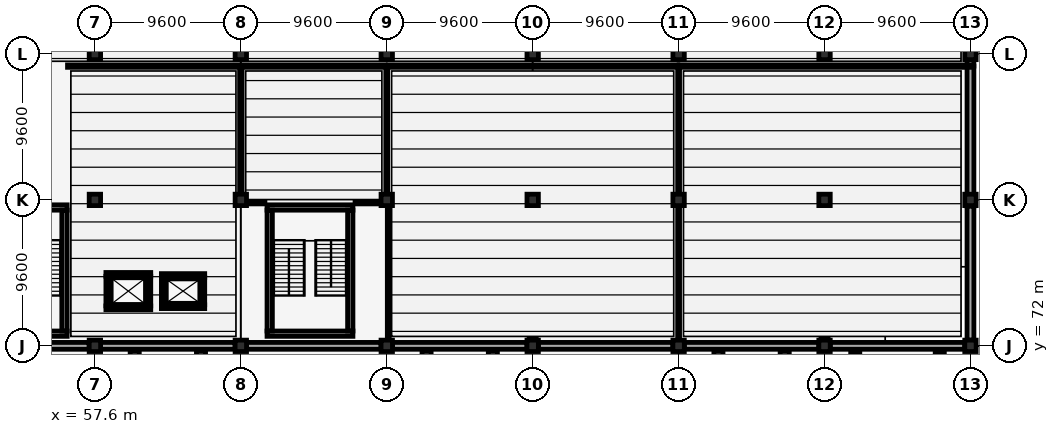
"""IFC4 building model, lengths in metres.
Left out: names, types, materials, properties, quantities, classifications, styles, units other than length and angle.
Written with IfcOpenShell. Run it as: python <this file> out.ifc"""

import sys

from ifc_helpers import new_model, si_unit, direction, frame, frame_2d, origin, origin_2d, place, context, subcontext, project, spatial, rectangle, extrude, element, fill, save


model = new_model("IFC4")
c1 = context("Model", 3, precision=1e-05, world=origin(), true_north=direction((0.0, 1.0)))
c2 = subcontext(c1, "Body", "Model", "MODEL_VIEW")
j1 = project(units=[si_unit("LENGTHUNIT", "METRE"), si_unit("PLANEANGLEUNIT", "RADIAN")], contexts=[c1])
p1 = place(None, origin())
s1 = spatial("IfcSite", under=j1, at=p1, CompositionType="ELEMENT")
p2 = place(p1, origin())
s2 = spatial("IfcBuilding", under=s1, at=p2, CompositionType="ELEMENT")
p3 = place(p2, frame((0.0, 0.0, -4.2)))
s3 = spatial("IfcBuildingStorey", under=s2, at=p3, CompositionType="ELEMENT", Elevation=-4.2)
for number, where, z_axis, x_axis in (
    (1, (57.6, 72.0, 0.0), (0.0, 0.0, 1.0), (1.0, 0.0, 0.0)),
    (2, (57.6, 81.6, 0.0), (0.0, 0.0, 1.0), (1.0, 0.0, 0.0)),
    (3, (57.6, 91.2, 0.0), (0.0, 0.0, 1.0), (1.0, 0.0, 0.0)),
    (4, (67.2, 72.0, 0.0), (0.0, 0.0, 1.0), (1.0, 0.0, 0.0)),
    (5, (67.2, 81.6, 0.0), (0.0, 0.0, 1.0), (1.0, 0.0, 0.0)),
    (6, (67.2, 91.2, 0.0), (0.0, 0.0, 1.0), (1.0, 0.0, 0.0)),
    (7, (76.8, 72.0, 0.0), (0.0, 0.0, 1.0), (1.0, 0.0, 0.0)),
    (8, (76.8, 81.6, 0.0), (0.0, 0.0, 1.0), (1.0, 0.0, 0.0)),
    (9, (76.8, 91.2, 0.0), (0.0, 0.0, 1.0), (1.0, 0.0, 0.0)),
    (10, (86.4, 72.0, 0.0), (0.0, 0.0, 1.0), (1.0, 0.0, 0.0)),
    (11, (86.4, 81.6, 0.0), (0.0, 0.0, 1.0), (1.0, 0.0, 0.0)),
    (12, (86.4, 91.2, 0.0), (0.0, 0.0, 1.0), (1.0, 0.0, 0.0)),
    (13, (96.0, 72.0, 0.0), (0.0, 0.0, 1.0), (1.0, 0.0, 0.0)),
    (14, (96.0, 81.6, 0.0), (0.0, 0.0, 1.0), (1.0, 0.0, 0.0)),
    (15, (96.0, 91.2, 0.0), (0.0, 0.0, 1.0), (1.0, 0.0, 0.0)),
    (16, (105.6, 72.0, 0.0), (0.0, 0.0, 1.0), (1.0, 0.0, 0.0)),
    (17, (105.6, 81.6, 0.0), (0.0, 0.0, 1.0), (1.0, 0.0, 0.0)),
    (18, (105.6, 91.2, 0.0), (0.0, 0.0, 1.0), (1.0, 0.0, 0.0)),
    (19, (115.2, 72.0, 0.0), (0.0, 0.0, 1.0), (1.0, 0.0, 0.0)),
    (20, (115.2, 81.6, 0.0), (0.0, 0.0, 1.0), (1.0, 0.0, 0.0)),
    (21, (115.2, 91.2, 0.0), (0.0, 0.0, 1.0), (1.0, 0.0, 0.0)),
):
    element("IfcColumn", number, at=place(p3, frame(where, z_axis=z_axis, x_axis=x_axis)), inside=s3, PredefinedType="COLUMN", context=c2, shape_type="SweptSolid", body=[
        extrude(rectangle(XDim=0.75, YDim=0.75, at=origin_2d()), origin(), (0.0, 0.0, 1.0), 4.2),
    ])
p4 = place(p3, frame((48.375, 72.0, 0.0), z_axis=(0.0, 0.0, 1.0), x_axis=(1.0, 0.0, 0.0)))
e22 = element("IfcWall", 22, at=p4, inside=s3, PredefinedType="SOLIDWALL", context=c2, shape_type="SweptSolid", body=[
    extrude(rectangle(XDim=8.85, YDim=0.45, at=frame_2d((4.425, 0.0))), origin(), (0.0, 0.0, 1.0), 3.84),
])
p5 = place(p3, frame((57.975, 72.0, 0.0), z_axis=(0.0, 0.0, 1.0), x_axis=(1.0, 0.0, 0.0)))
e23 = element("IfcWall", 23, at=p5, inside=s3, PredefinedType="SOLIDWALL", context=c2, shape_type="SweptSolid", body=[
    extrude(rectangle(XDim=8.85, YDim=0.45, at=frame_2d((4.425, 0.0))), origin(), (0.0, 0.0, 1.0), 3.84),
])
p6 = place(p3, frame((67.575, 72.0, 0.0), z_axis=(0.0, 0.0, 1.0), x_axis=(1.0, 0.0, 0.0)))
e24 = element("IfcWall", 24, at=p6, inside=s3, PredefinedType="SOLIDWALL", context=c2, shape_type="SweptSolid", body=[
    extrude(rectangle(XDim=8.85, YDim=0.45, at=frame_2d((4.425, 0.0))), origin(), (0.0, 0.0, 1.0), 3.84),
])
p7 = place(p3, frame((77.175, 72.0, 0.0), z_axis=(0.0, 0.0, 1.0), x_axis=(1.0, 0.0, 0.0)))
e25 = element("IfcWall", 25, at=p7, inside=s3, PredefinedType="SOLIDWALL", context=c2, shape_type="SweptSolid", body=[
    extrude(rectangle(XDim=8.85, YDim=0.45, at=frame_2d((4.425, 0.0))), origin(), (0.0, 0.0, 1.0), 3.84),
])
for number, where, z_axis, x_axis in (
    (26, (86.775, 72.0, 0.0), (0.0, 0.0, 1.0), (1.0, 0.0, 0.0)),
    (27, (96.375, 72.0, 0.0), (0.0, 0.0, 1.0), (1.0, 0.0, 0.0)),
):
    element("IfcWall", number, at=place(p3, frame(where, z_axis=z_axis, x_axis=x_axis)), inside=s3, PredefinedType="SOLIDWALL", context=c2, shape_type="SweptSolid", body=[
        extrude(rectangle(XDim=8.85, YDim=0.45, at=frame_2d((4.425, 0.0))), origin(), (0.0, 0.0, 1.0), 3.84),
    ])
p8 = place(p3, frame((105.975, 72.0, 0.0), z_axis=(0.0, 0.0, 1.0), x_axis=(1.0, 0.0, 0.0)))
e28 = element("IfcWall", 28, at=p8, inside=s3, PredefinedType="SOLIDWALL", context=c2, shape_type="SweptSolid", body=[
    extrude(rectangle(XDim=8.85, YDim=0.45, at=frame_2d((4.425, 0.0))), origin(), (0.0, 0.0, 1.0), 3.84),
])
p9 = place(p3, frame((115.2, 72.375, 0.0), z_axis=(0.0, 0.0, 1.0), x_axis=(0.0, 1.0, 0.0)))
e29 = element("IfcWall", 29, at=p9, inside=s3, PredefinedType="SOLIDWALL", context=c2, shape_type="SweptSolid", body=[
    extrude(rectangle(XDim=8.825, YDim=0.45, at=frame_2d((4.413, 0.0))), origin(), (0.0, 0.0, 1.0), 3.84),
])
p10 = place(p3, frame((115.2, 81.2, 0.0), z_axis=(0.0, 0.0, 1.0), x_axis=(0.0, 1.0, 0.0)))
e30 = element("IfcWall", 30, at=p10, inside=s3, PredefinedType="SOLIDWALL", context=c2, shape_type="SweptSolid", body=[
    extrude(rectangle(XDim=9.2, YDim=0.45, at=frame_2d((4.6, 0.0))), origin(), (0.0, 0.0, 1.0), 3.84),
])
p11 = place(p3, frame((115.2, 90.4, 0.0), z_axis=(0.0, 0.0, 1.0), x_axis=(0.0, 1.0, 0.0)))
e31 = element("IfcWall", 31, at=p11, inside=s3, PredefinedType="SOLIDWALL", context=c2, shape_type="SweptSolid", body=[
    extrude(rectangle(XDim=9.2, YDim=0.45, at=frame_2d((4.6, 0.0))), origin(), (0.0, 0.0, 1.0), 3.84),
])
for number, where, z_axis, x_axis in (
    (32, (64.58, 71.38, 0.0), (0.0, 0.0, 1.0), (1.0, 0.0, 0.0)),
    (33, (60.22, 71.38, 0.0), (0.0, 0.0, 1.0), (1.0, 0.0, 0.0)),
    (34, (83.78, 71.38, 0.0), (0.0, 0.0, 1.0), (1.0, 0.0, 0.0)),
    (35, (79.42, 71.38, 0.0), (0.0, 0.0, 1.0), (1.0, 0.0, 0.0)),
    (36, (102.98, 71.38, 0.0), (0.0, 0.0, 1.0), (1.0, 0.0, 0.0)),
    (37, (98.62, 71.38, 0.0), (0.0, 0.0, 1.0), (1.0, 0.0, 0.0)),
    (38, (113.18, 71.28, 0.0), (0.0, 0.0, 1.0), (1.0, 0.0, 0.0)),
    (39, (107.62, 71.28, 0.0), (0.0, 0.0, 1.0), (1.0, 0.0, 0.0)),
):
    element("IfcColumn", number, at=place(p3, frame(where, z_axis=z_axis, x_axis=x_axis)), inside=s3, PredefinedType="COLUMN", context=c2, shape_type="SweptSolid", body=[
        extrude(rectangle(XDim=0.6, YDim=0.6, at=origin_2d()), origin(), (0.0, 0.0, 1.0), 4.2),
    ])
for number, where, z_axis, x_axis in (
    (40, (55.775, 72.8, 0.0), (0.0, 0.0, 1.0), (-1.0, 0.0, 0.0)),
    (41, (50.125, 81.1, 0.0), (0.0, 0.0, 1.0), (1.0, 0.0, 0.0)),
):
    element("IfcWall", number, at=place(p3, frame(where, z_axis=z_axis, x_axis=x_axis)), inside=s3, PredefinedType="SHEAR", context=c2, shape_type="SweptSolid", body=[
        extrude(rectangle(XDim=5.65, YDim=0.35, at=frame_2d((2.825, 0.0))), origin(), (0.0, 0.0, 1.0), 3.95),
    ])
p12 = place(p3, frame((55.6, 80.925, 0.0), z_axis=(0.0, 0.0, 1.0), x_axis=(0.0, -1.0, 0.0)))
e42 = element("IfcWall", 42, at=p12, inside=s3, PredefinedType="SHEAR", context=c2, shape_type="SweptSolid", body=[
    extrude(rectangle(XDim=7.95, YDim=0.35, at=frame_2d((3.975, 0.0))), origin(), (0.0, 0.0, 1.0), 3.95),
])
p13 = place(p12, frame((5.68, 0.0, 0.0)))
e43 = element("IfcOpeningElement", 43, at=p13, cuts=e42, PredefinedType="OPENING", context=c2, shape_type="SweptSolid", body=[
    extrude(rectangle(XDim=2.05, YDim=2.15, at=frame_2d((1.025, 1.075))), frame((0.0, 0.185, 0.0), z_axis=(0.0, -1.0, 0.0), x_axis=(1.0, 0.0, 0.0)), (0.0, 0.0, 1.0), 0.37),
])
for number, where, z_axis, x_axis in (
    (44, (74.575, 72.8, 0.0), (0.0, 0.0, 1.0), (-1.0, 0.0, 0.0)),
    (45, (68.925, 81.1, 0.0), (0.0, 0.0, 1.0), (1.0, 0.0, 0.0)),
):
    element("IfcWall", number, at=place(p3, frame(where, z_axis=z_axis, x_axis=x_axis)), inside=s3, PredefinedType="SHEAR", context=c2, shape_type="SweptSolid", body=[
        extrude(rectangle(XDim=5.65, YDim=0.35, at=frame_2d((2.825, 0.0))), origin(), (0.0, 0.0, 1.0), 3.95),
    ])
p14 = place(p3, frame((69.1, 72.975, 0.0), z_axis=(0.0, 0.0, 1.0), x_axis=(0.0, 1.0, 0.0)))
e46 = element("IfcWall", 46, at=p14, inside=s3, PredefinedType="SHEAR", context=c2, shape_type="SweptSolid", body=[
    extrude(rectangle(XDim=7.95, YDim=0.35, at=frame_2d((3.975, 0.0))), origin(), (0.0, 0.0, 1.0), 3.95),
])
p15 = place(p3, frame((74.4, 80.925, 0.0), z_axis=(0.0, 0.0, 1.0), x_axis=(0.0, -1.0, 0.0)))
e47 = element("IfcWall", 47, at=p15, inside=s3, PredefinedType="SHEAR", context=c2, shape_type="SweptSolid", body=[
    extrude(rectangle(XDim=7.95, YDim=0.35, at=frame_2d((3.975, 0.0))), origin(), (0.0, 0.0, 1.0), 3.95),
])
p16 = place(p15, frame((5.68, 0.0, 0.0)))
e48 = element("IfcOpeningElement", 48, at=p16, cuts=e47, PredefinedType="OPENING", context=c2, shape_type="SweptSolid", body=[
    extrude(rectangle(XDim=2.05, YDim=2.15, at=frame_2d((1.025, 1.075))), frame((0.0, 0.185, 0.0), z_axis=(0.0, -1.0, 0.0), x_axis=(1.0, 0.0, 0.0)), (0.0, 0.0, 1.0), 0.37),
])
p17 = place(p3, frame((61.275, 74.5, -1.5), z_axis=(0.0, 0.0, 1.0), x_axis=(-1.0, 0.0, 0.0)))
e49 = element("IfcWall", 49, at=p17, inside=s3, PredefinedType="SOLIDWALL", context=c2, shape_type="SweptSolid", body=[
    extrude(rectangle(XDim=2.95, YDim=0.25, at=frame_2d((1.475, 0.0))), origin(), (0.0, 0.0, 1.0), 5.45),
])
p18 = place(p3, frame((58.325, 76.7, -1.5), z_axis=(0.0, 0.0, 1.0), x_axis=(1.0, 0.0, 0.0)))
e50 = element("IfcWall", 50, at=p18, inside=s3, PredefinedType="SOLIDWALL", context=c2, shape_type="SweptSolid", body=[
    extrude(rectangle(XDim=2.95, YDim=0.25, at=frame_2d((1.475, 0.0))), origin(), (0.0, 0.0, 1.0), 5.45),
])
p19 = place(p18, frame((0.925, 0.0, 1.5)))
e51 = element("IfcOpeningElement", 51, at=p19, cuts=e50, PredefinedType="OPENING", context=c2, shape_type="SweptSolid", body=[
    extrude(rectangle(XDim=1.1, YDim=2.15, at=frame_2d((0.55, 1.075))), frame((0.0, 0.135, 0.0), z_axis=(0.0, -1.0, 0.0), x_axis=(1.0, 0.0, 0.0)), (0.0, 0.0, 1.0), 0.27),
])
for number, where, z_axis, x_axis in (
    (52, (58.45, 74.625, -1.5), (0.0, 0.0, 1.0), (0.0, 1.0, 0.0)),
    (53, (61.15, 76.575, -1.5), (0.0, 0.0, 1.0), (0.0, -1.0, 0.0)),
):
    element("IfcWall", number, at=place(p3, frame(where, z_axis=z_axis, x_axis=x_axis)), inside=s3, PredefinedType="SOLIDWALL", context=c2, shape_type="SweptSolid", body=[
        extrude(rectangle(XDim=1.95, YDim=0.25, at=frame_2d((0.975, 0.0))), origin(), (0.0, 0.0, 1.0), 5.45),
    ])
p20 = place(p3, frame((64.825, 74.575, -1.5), z_axis=(0.0, 0.0, 1.0), x_axis=(-1.0, 0.0, 0.0)))
e54 = element("IfcWall", 54, at=p20, inside=s3, PredefinedType="SOLIDWALL", context=c2, shape_type="SweptSolid", body=[
    extrude(rectangle(XDim=2.85, YDim=0.25, at=frame_2d((1.425, 0.0))), origin(), (0.0, 0.0, 1.0), 5.45),
])
p21 = place(p3, frame((61.975, 76.625, -1.5), z_axis=(0.0, 0.0, 1.0), x_axis=(1.0, 0.0, 0.0)))
e55 = element("IfcWall", 55, at=p21, inside=s3, PredefinedType="SOLIDWALL", context=c2, shape_type="SweptSolid", body=[
    extrude(rectangle(XDim=2.85, YDim=0.25, at=frame_2d((1.425, 0.0))), origin(), (0.0, 0.0, 1.0), 5.45),
])
p22 = place(p21, frame((0.875, 0.0, 1.5)))
e56 = element("IfcOpeningElement", 56, at=p22, cuts=e55, PredefinedType="OPENING", context=c2, shape_type="SweptSolid", body=[
    extrude(rectangle(XDim=1.1, YDim=2.15, at=frame_2d((0.55, 1.075))), frame((0.0, 0.135, 0.0), z_axis=(0.0, -1.0, 0.0), x_axis=(1.0, 0.0, 0.0)), (0.0, 0.0, 1.0), 0.27),
])
for number, where, z_axis, x_axis in (
    (57, (62.1, 74.7, -1.5), (0.0, 0.0, 1.0), (0.0, 1.0, 0.0)),
    (58, (64.7, 76.5, -1.5), (0.0, 0.0, 1.0), (0.0, -1.0, 0.0)),
):
    element("IfcWall", number, at=place(p3, frame(where, z_axis=z_axis, x_axis=x_axis)), inside=s3, PredefinedType="SOLIDWALL", context=c2, shape_type="SweptSolid", body=[
        extrude(rectangle(XDim=1.8, YDim=0.25, at=frame_2d((0.9, 0.0))), origin(), (0.0, 0.0, 1.0), 5.45),
    ])
p23 = place(p3, frame((67.2, 81.4, 0.0), z_axis=(0.0, 0.0, 1.0), x_axis=(0.0, 1.0, 0.0)))
e59 = element("IfcWall", 59, at=p23, inside=s3, PredefinedType="PARTITIONING", context=c2, shape_type="SweptSolid", body=[
    extrude(rectangle(XDim=8.9, YDim=0.16, at=frame_2d((4.45, 0.0))), origin(), (0.0, 0.0, 1.0), 3.255),
])
p24 = place(p23, frame((3.9, 0.0, 0.0)))
e60 = element("IfcOpeningElement", 60, at=p24, cuts=e59, PredefinedType="OPENING", context=c2, shape_type="SweptSolid", body=[
    extrude(rectangle(XDim=1.1, YDim=2.18, at=frame_2d((0.55, 1.09))), frame((0.0, 0.09, 0.0), z_axis=(0.0, -1.0, 0.0), x_axis=(1.0, 0.0, 0.0)), (0.0, 0.0, 1.0), 0.18),
])
p25 = place(p3, frame((55.8, 90.4, 0.0), z_axis=(0.0, 0.0, 1.0), x_axis=(1.0, 0.0, 0.0)))
e61 = element("IfcWall", 61, at=p25, inside=s3, PredefinedType="PARTITIONING", context=c2, shape_type="SweptSolid", body=[
    extrude(rectangle(XDim=11.3, YDim=0.16, at=frame_2d((5.65, 0.0))), origin(), (0.0, 0.0, 1.0), 3.84),
])
p26 = place(p25, frame((4.75, 0.0, 0.0)))
e62 = element("IfcOpeningElement", 62, at=p26, cuts=e61, PredefinedType="OPENING", context=c2, shape_type="SweptSolid", body=[
    extrude(rectangle(XDim=1.8, YDim=2.15, at=frame_2d((0.9, 1.075))), frame((0.0, 0.09, 0.0), z_axis=(0.0, -1.0, 0.0), x_axis=(1.0, 0.0, 0.0)), (0.0, 0.0, 1.0), 0.18),
])
p27 = place(p3, frame((76.8, 81.4, 0.0), z_axis=(0.0, 0.0, 1.0), x_axis=(0.0, 1.0, 0.0)))
e63 = element("IfcWall", 63, at=p27, inside=s3, PredefinedType="PARTITIONING", context=c2, shape_type="SweptSolid", body=[
    extrude(rectangle(XDim=8.9, YDim=0.125, at=frame_2d((4.45, 0.0))), origin(), (0.0, 0.0, 1.0), 3.295),
])
p28 = place(p3, frame((67.3, 90.4, 0.0), z_axis=(0.0, 0.0, 1.0), x_axis=(1.0, 0.0, 0.0)))
e64 = element("IfcWall", 64, at=p28, inside=s3, PredefinedType="PARTITIONING", context=c2, shape_type="SweptSolid", body=[
    extrude(rectangle(XDim=9.4, YDim=0.16, at=frame_2d((4.7, 0.0))), origin(), (0.0, 0.0, 1.0), 3.84),
])
p29 = place(p28, frame((4.15, 0.0, 0.0)))
e65 = element("IfcOpeningElement", 65, at=p29, cuts=e64, PredefinedType="OPENING", context=c2, shape_type="SweptSolid", body=[
    extrude(rectangle(XDim=1.1, YDim=2.18, at=frame_2d((0.55, 1.09))), frame((0.0, 0.09, 0.0), z_axis=(0.0, -1.0, 0.0), x_axis=(1.0, 0.0, 0.0)), (0.0, 0.0, 1.0), 0.18),
])
p30 = place(p3, frame((96.0, 72.05, 0.0), z_axis=(0.0, 0.0, 1.0), x_axis=(0.0, 1.0, 0.0)))
e66 = element("IfcWall", 66, at=p30, inside=s3, PredefinedType="PARTITIONING", context=c2, shape_type="SweptSolid", body=[
    extrude(rectangle(XDim=18.25, YDim=0.125, at=frame_2d((9.125, 0.0))), origin(), (0.0, 0.0, 1.0), 3.275),
])
p31 = place(p3, frame((76.9, 90.4, 0.0), z_axis=(0.0, 0.0, 1.0), x_axis=(1.0, 0.0, 0.0)))
e67 = element("IfcWall", 67, at=p31, inside=s3, PredefinedType="PARTITIONING", context=c2, shape_type="SweptSolid", body=[
    extrude(rectangle(XDim=19.05, YDim=0.16, at=frame_2d((9.525, 0.0))), origin(), (0.0, 0.0, 1.0), 3.84),
])
p32 = place(p31, frame((6.391, 0.0, 0.0)))
e68 = element("IfcOpeningElement", 68, at=p32, cuts=e67, PredefinedType="OPENING", context=c2, shape_type="SweptSolid", body=[
    extrude(rectangle(XDim=1.1, YDim=2.18, at=frame_2d((0.55, 1.09))), frame((0.0, 0.09, 0.0), z_axis=(0.0, -1.0, 0.0), x_axis=(1.0, 0.0, 0.0)), (0.0, 0.0, 1.0), 0.18),
])
p33 = place(p3, frame((96.03, 90.4, 0.0), z_axis=(0.0, 0.0, 1.0), x_axis=(1.0, 0.0, 0.0)))
e69 = element("IfcWall", 69, at=p33, inside=s3, PredefinedType="PARTITIONING", context=c2, shape_type="SweptSolid", body=[
    extrude(rectangle(XDim=19.12, YDim=0.16, at=frame_2d((9.56, 0.0))), origin(), (0.0, 0.0, 1.0), 3.84),
])
p34 = place(p33, frame((11.572, 0.0, 0.0)))
e70 = element("IfcOpeningElement", 70, at=p34, cuts=e69, PredefinedType="OPENING", context=c2, shape_type="SweptSolid", body=[
    extrude(rectangle(XDim=1.15, YDim=2.2, at=frame_2d((0.575, 1.1))), frame((0.0, 0.09, 0.0), z_axis=(0.0, -1.0, 0.0), x_axis=(1.0, 0.0, 0.0)), (0.0, 0.0, 1.0), 0.18),
])
p35 = place(p3, frame((67.44, 81.4, 0.0), z_axis=(0.0, 0.0, 1.0), x_axis=(1.0, 0.0, 0.0)))
e71 = element("IfcWall", 71, at=p35, inside=s3, PredefinedType="PARTITIONING", context=c2, shape_type="SweptSolid", body=[
    extrude(rectangle(XDim=1.345, YDim=0.125, at=frame_2d((0.672, 0.0))), origin(), (0.0, 0.0, 1.0), 3.252),
])
p36 = place(p3, frame((74.715, 81.4, 0.0), z_axis=(0.0, 0.0, 1.0), x_axis=(1.0, 0.0, 0.0)))
e72 = element("IfcWall", 72, at=p36, inside=s3, PredefinedType="PARTITIONING", context=c2, shape_type="SweptSolid", body=[
    extrude(rectangle(XDim=1.845, YDim=0.125, at=frame_2d((0.922, 0.0))), origin(), (0.0, 0.0, 1.0), 3.252),
])
p37 = place(p3, frame((86.165, 72.4, 0.0), z_axis=(0.0, 0.0, 1.0), x_axis=(1.0, 0.0, 0.0)))
e73 = element("IfcWall", 73, at=p37, inside=s3, PredefinedType="PARTITIONING", context=c2, shape_type="SweptSolid", body=[
    extrude(rectangle(XDim=0.47, YDim=0.125, at=frame_2d((0.235, 0.0))), origin(), (0.0, 0.0, 1.0), 3.84),
])
p38 = place(p3, frame((76.9, 72.05, 0.0), z_axis=(0.0, 0.0, 1.0), x_axis=(0.0, 1.0, 0.0)))
e74 = element("IfcWall", 74, at=p38, inside=s3, PredefinedType="PARTITIONING", context=c2, shape_type="SweptSolid", body=[
    extrude(rectangle(XDim=9.21, YDim=0.125, at=frame_2d((4.605, 0.0))), origin(), (0.0, 0.0, 1.0), 3.275),
])
p39 = place(p3, frame((105.365, 72.4, 0.0), z_axis=(0.0, 0.0, 1.0), x_axis=(1.0, 0.0, 0.0)))
e75 = element("IfcWall", 75, at=p39, inside=s3, PredefinedType="PARTITIONING", context=c2, shape_type="SweptSolid", body=[
    extrude(rectangle(XDim=0.47, YDim=0.125, at=frame_2d((0.235, 0.0))), origin(), (0.0, 0.0, 1.0), 3.84),
])
p40 = place(p13, origin())
e76 = element("IfcDoor", 76, at=p40, inside=s3, OperationType="DOUBLE_DOOR_SINGLE_SWING", PredefinedType="DOOR", context=c2, shape_type="SweptSolid", body=[
    extrude(rectangle(XDim=2.05, YDim=2.15, at=frame_2d((1.025, 1.075))), frame((0.0, 0.025, 0.0), z_axis=(0.0, -1.0, 0.0), x_axis=(1.0, 0.0, 0.0)), (0.0, 0.0, 1.0), 0.05),
])
fill(e43, e76)
p41 = place(p16, origin())
e77 = element("IfcDoor", 77, at=p41, inside=s3, OperationType="DOUBLE_DOOR_SINGLE_SWING", PredefinedType="DOOR", context=c2, shape_type="SweptSolid", body=[
    extrude(rectangle(XDim=2.05, YDim=2.15, at=frame_2d((1.025, 1.075))), frame((0.0, 0.025, 0.0), z_axis=(0.0, -1.0, 0.0), x_axis=(1.0, 0.0, 0.0)), (0.0, 0.0, 1.0), 0.05),
])
fill(e48, e77)
p42 = place(p19, origin())
e78 = element("IfcDoor", 78, at=p42, inside=s3, OperationType="DOUBLE_DOOR_SLIDING", PredefinedType="DOOR", context=c2, shape_type="SweptSolid", body=[
    extrude(rectangle(XDim=1.1, YDim=2.15, at=frame_2d((0.55, 1.075))), frame((0.0, 0.025, 0.0), z_axis=(0.0, -1.0, 0.0), x_axis=(1.0, 0.0, 0.0)), (0.0, 0.0, 1.0), 0.05),
])
fill(e51, e78)
p43 = place(p22, origin())
e79 = element("IfcDoor", 79, at=p43, inside=s3, OperationType="DOUBLE_DOOR_SLIDING", PredefinedType="DOOR", context=c2, shape_type="SweptSolid", body=[
    extrude(rectangle(XDim=1.1, YDim=2.15, at=frame_2d((0.55, 1.075))), frame((0.0, 0.025, 0.0), z_axis=(0.0, -1.0, 0.0), x_axis=(1.0, 0.0, 0.0)), (0.0, 0.0, 1.0), 0.05),
])
fill(e56, e79)
p44 = place(p24, origin())
e80 = element("IfcDoor", 80, at=p44, inside=s3, OperationType="SINGLE_SWING_RIGHT", PredefinedType="DOOR", context=c2, shape_type="SweptSolid", body=[
    extrude(rectangle(XDim=1.1, YDim=2.18, at=frame_2d((0.55, 1.09))), frame((0.0, 0.025, 0.0), z_axis=(0.0, -1.0, 0.0), x_axis=(1.0, 0.0, 0.0)), (0.0, 0.0, 1.0), 0.05),
])
fill(e60, e80)
p45 = place(p26, origin())
e81 = element("IfcDoor", 81, at=p45, inside=s3, OperationType="DOUBLE_DOOR_SINGLE_SWING", PredefinedType="DOOR", context=c2, shape_type="SweptSolid", body=[
    extrude(rectangle(XDim=1.8, YDim=2.15, at=frame_2d((0.9, 1.075))), frame((0.0, 0.025, 0.0), z_axis=(0.0, -1.0, 0.0), x_axis=(1.0, 0.0, 0.0)), (0.0, 0.0, 1.0), 0.05),
])
fill(e62, e81)
p46 = place(p29, origin())
e82 = element("IfcDoor", 82, at=p46, inside=s3, OperationType="SINGLE_SWING_RIGHT", PredefinedType="DOOR", context=c2, shape_type="SweptSolid", body=[
    extrude(rectangle(XDim=1.1, YDim=2.18, at=frame_2d((0.55, 1.09))), frame((0.0, 0.025, 0.0), z_axis=(0.0, -1.0, 0.0), x_axis=(1.0, 0.0, 0.0)), (0.0, 0.0, 1.0), 0.05),
])
fill(e65, e82)
p47 = place(p32, origin())
e83 = element("IfcDoor", 83, at=p47, inside=s3, OperationType="SINGLE_SWING_LEFT", PredefinedType="DOOR", context=c2, shape_type="SweptSolid", body=[
    extrude(rectangle(XDim=1.1, YDim=2.18, at=frame_2d((0.55, 1.09))), frame((0.0, 0.025, 0.0), z_axis=(0.0, -1.0, 0.0), x_axis=(1.0, 0.0, 0.0)), (0.0, 0.0, 1.0), 0.05),
])
fill(e68, e83)
p48 = place(p34, origin())
e84 = element("IfcDoor", 84, at=p48, inside=s3, OperationType="SINGLE_SWING_RIGHT", PredefinedType="DOOR", context=c2, shape_type="SweptSolid", body=[
    extrude(rectangle(XDim=1.15, YDim=2.2, at=frame_2d((0.575, 1.1))), frame((0.0, 0.025, 0.0), z_axis=(0.0, -1.0, 0.0), x_axis=(1.0, 0.0, 0.0)), (0.0, 0.0, 1.0), 0.05),
])
fill(e70, e84)
save(model, sys.argv[1])
